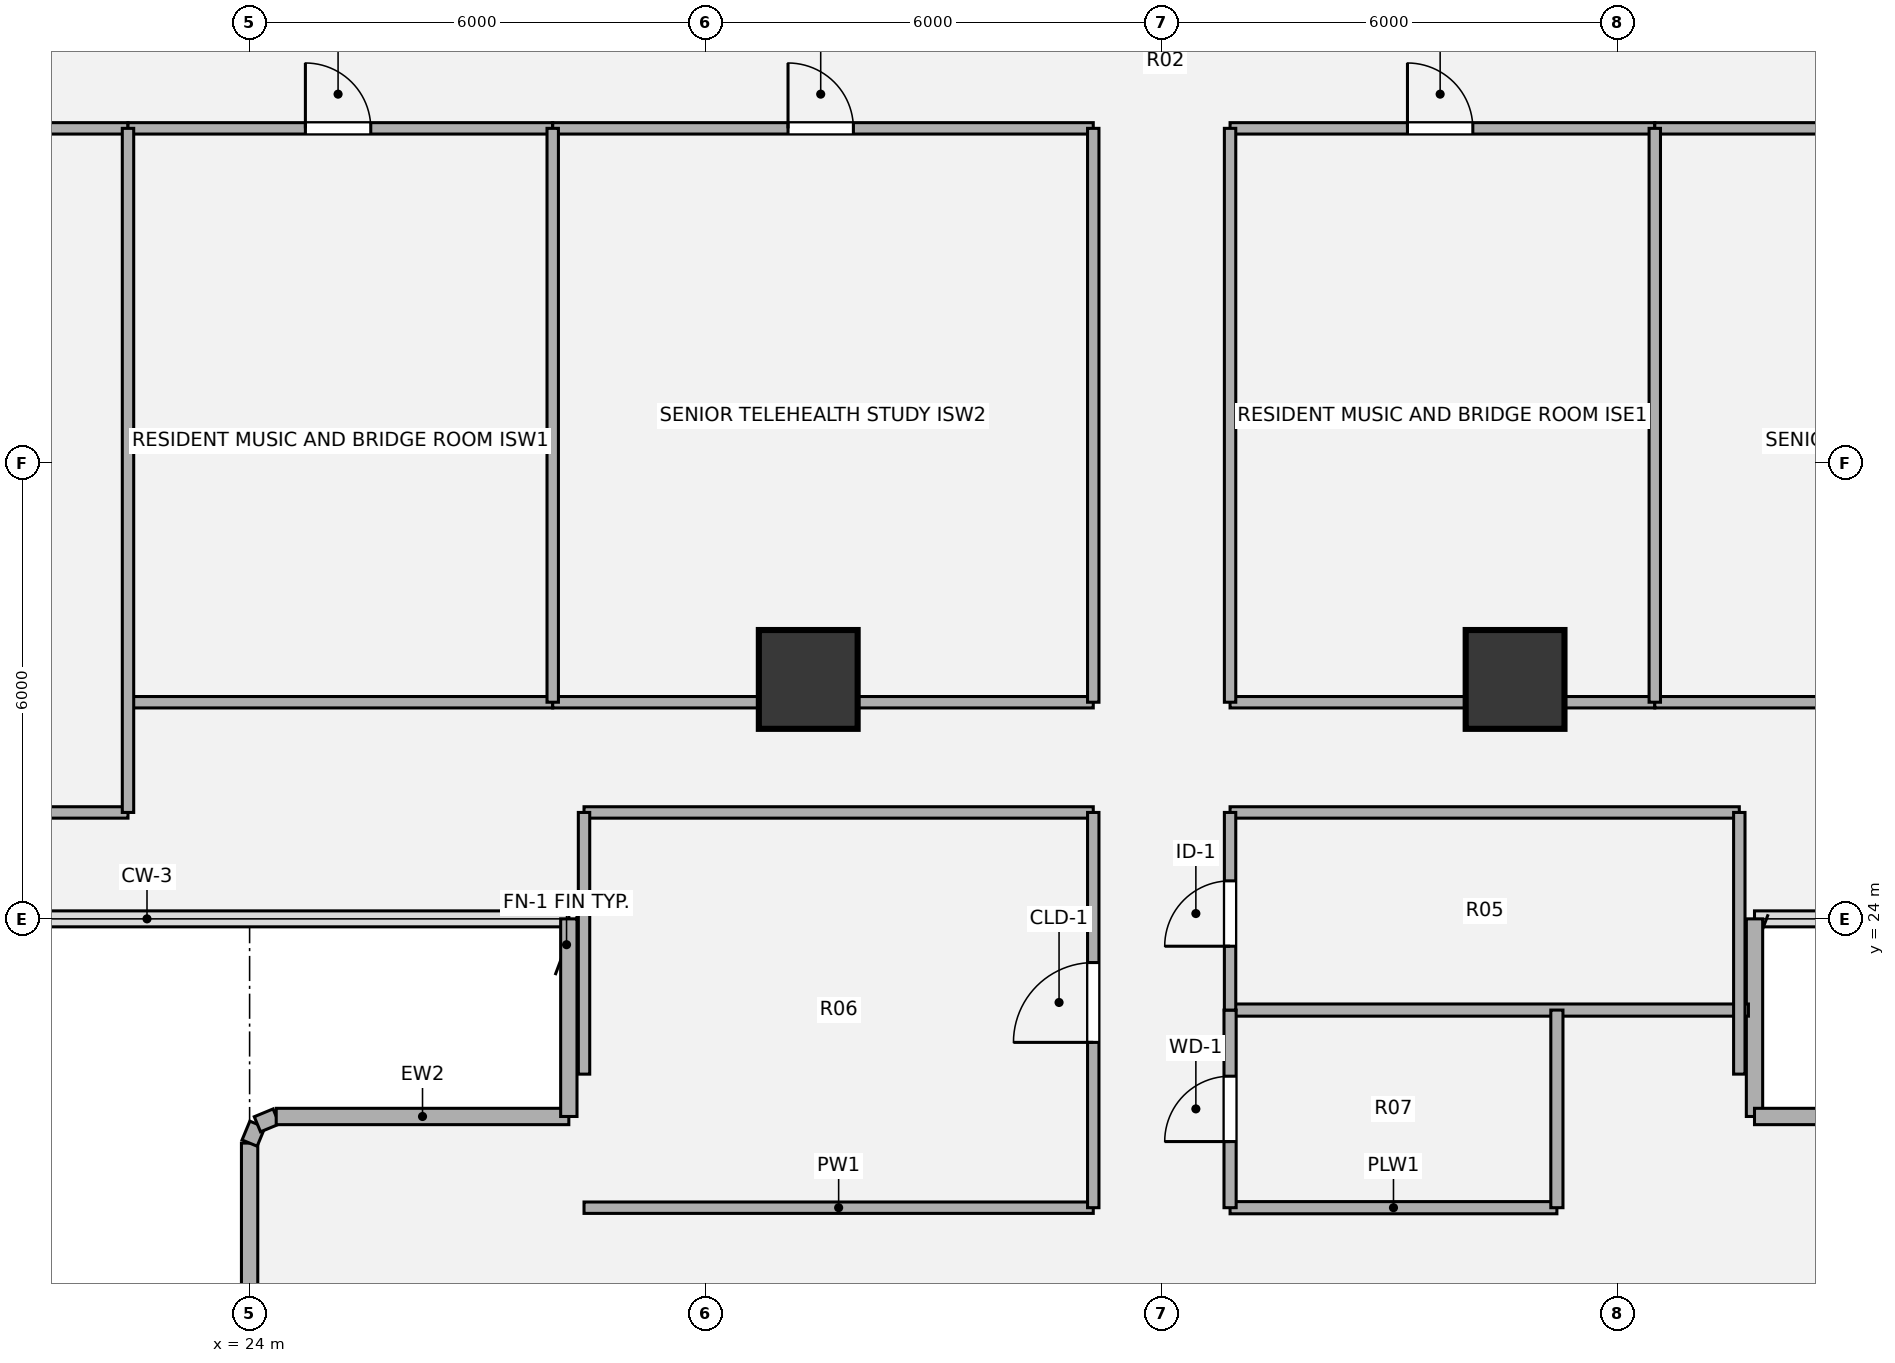
"""IFC4 building model, lengths in metres.
Left out: names, types, materials, properties, quantities, classifications, styles, units other than length and angle.
Written with IfcOpenShell. Run it as: python <this file> out.ifc"""

import sys

from ifc_helpers import new_model, si_unit, direction, frame, frame_2d, origin, origin_2d, place, context, subcontext, project, spatial, rectangle, hollow_circle, extrude, source, transform, mapped, element, fill, save


model = new_model("IFC4")
c1 = context("Model", 3, precision=1e-05, world=origin(), true_north=direction((0.0, 1.0)))
c2 = subcontext(c1, "Body", "Model", "MODEL_VIEW")
j1 = project(units=[si_unit("LENGTHUNIT", "METRE"), si_unit("PLANEANGLEUNIT", "RADIAN")], contexts=[c1])
p1 = place(None, origin())
s1 = spatial("IfcSite", under=j1, at=p1, CompositionType="ELEMENT")
p2 = place(p1, origin())
s2 = spatial("IfcBuilding", under=s1, at=p2, CompositionType="ELEMENT")
p3 = place(p2, frame((0.0, 0.0, 120.06)))
s3 = spatial("IfcBuildingStorey", under=s2, at=p3, CompositionType="ELEMENT", Elevation=120.06)
m1 = source(origin(), c2, "Body", "SweptSolid", [
    extrude(hollow_circle(Radius=0.65, WallThickness=0.045, at=origin_2d()), origin(), (0.0, 0.0, 1.0), 3.78),
])
for number, where, z_axis, x_axis in (
    (1, (31.35, 27.15, 0.0), (0.0, 0.0, 1.0), (1.0, 0.0, 0.0)),
    (2, (40.65, 27.15, 0.0), (0.0, 0.0, 1.0), (1.0, 0.0, 0.0)),
):
    element("IfcColumn", number, at=place(p3, frame(where, z_axis=z_axis, x_axis=x_axis)), inside=s3, PredefinedType="COLUMN", context=c2, shape_type="MappedRepresentation", body=[
        mapped(m1, transform((0.0, 0.0, 0.0), x_axis=(1.0, 0.0, 0.0), y_axis=(0.0, 1.0, 0.0), z_axis=(0.0, 0.0, 1.0), scale=1.0)),
    ])
p4 = place(p3, frame((24.0, 18.43, 0.0), z_axis=(0.0, 0.0, 1.0), x_axis=(0.0, 1.0, 0.0)))
e3 = element("IfcWall", 3, at=p4, inside=s3, PredefinedType="SOLIDWALL", context=c2, shape_type="SweptSolid", body=[
    extrude(rectangle(XDim=2.62, YDim=0.215, at=frame_2d((1.31, 0.0))), origin(), (0.0, 0.0, 1.0), 3.53),
])
p5 = place(p3, frame((24.0, 21.05, 0.0), z_axis=(0.0, 0.0, 1.0), x_axis=(0.382673670509, 0.923883575944, 0.0)))
e4 = element("IfcWall", 4, at=p5, inside=s3, PredefinedType="SOLIDWALL", context=c2, shape_type="SweptSolid", body=[
    extrude(rectangle(XDim=0.268, YDim=0.215, at=frame_2d((0.134, 0.0))), origin(), (0.0, 0.0, 1.0), 3.53),
])
p6 = place(p3, frame((24.103, 21.298, 0.0), z_axis=(0.0, 0.0, 1.0), x_axis=(0.924205486139, 0.381895560841, 0.0)))
e5 = element("IfcWall", 5, at=p6, inside=s3, PredefinedType="SOLIDWALL", context=c2, shape_type="SweptSolid", body=[
    extrude(rectangle(XDim=0.268, YDim=0.215, at=frame_2d((0.134, 0.0))), origin(), (0.0, 0.0, 1.0), 3.53),
])
p7 = place(p3, frame((24.35, 21.4, 0.0), z_axis=(0.0, 0.0, 1.0), x_axis=(1.0, 0.0, 0.0)))
e6 = element("IfcWall", 6, at=p7, inside=s3, PredefinedType="SOLIDWALL", context=c2, shape_type="SweptSolid", body=[
    extrude(rectangle(XDim=3.85, YDim=0.215, at=frame_2d((1.925, 0.0))), origin(), (0.0, 0.0, 1.0), 3.53),
])
for number, where, z_axis, x_axis in (
    (7, (28.2, 21.4, 0.0), (0.0, 0.0, 1.0), (0.0, 1.0, 0.0)),
    (8, (43.8, 24.0, 0.0), (0.0, 0.0, 1.0), (0.0, -1.0, 0.0)),
):
    element("IfcWall", number, at=place(p3, frame(where, z_axis=z_axis, x_axis=x_axis)), inside=s3, PredefinedType="SOLIDWALL", context=c2, shape_type="SweptSolid", body=[
        extrude(rectangle(XDim=2.6, YDim=0.215, at=frame_2d((1.3, 0.0))), origin(), (0.0, 0.0, 1.0), 3.53),
    ])
p8 = place(p3, frame((43.8, 21.4, 0.0), z_axis=(0.0, 0.0, 1.0), x_axis=(1.0, 0.0, 0.0)))
e9 = element("IfcWall", 9, at=p8, inside=s3, PredefinedType="SOLIDWALL", context=c2, shape_type="SweptSolid", body=[
    extrude(rectangle(XDim=3.85, YDim=0.215, at=frame_2d((1.925, 0.0))), origin(), (0.0, 0.0, 1.0), 3.53),
])
p9 = place(p3, frame((28.4, 20.2, 0.0), z_axis=(0.0, 0.0, 1.0), x_axis=(1.0, 0.0, 0.0)))
e10 = element("IfcWall", 10, at=p9, inside=s3, PredefinedType="PARTITIONING", context=c2, shape_type="SweptSolid", body=[
    extrude(rectangle(XDim=6.7, YDim=0.15, at=frame_2d((3.35, 0.0))), origin(), (0.0, 0.0, 1.0), 3.5),
])
p10 = place(p3, frame((36.9, 20.2, 0.0), z_axis=(0.0, 0.0, 1.0), x_axis=(1.0, 0.0, 0.0)))
e11 = element("IfcWall", 11, at=p10, inside=s3, PredefinedType="PLUMBINGWALL", context=c2, shape_type="SweptSolid", body=[
    extrude(rectangle(XDim=4.3, YDim=0.16, at=frame_2d((2.15, 0.0))), origin(), (0.0, 0.0, 1.0), 3.5),
])
p11 = place(p3, frame((36.9, 22.8, 0.0), z_axis=(0.0, 0.0, 1.0), x_axis=(1.0, 0.0, 0.0)))
e12 = element("IfcWall", 12, at=p11, inside=s3, PredefinedType="PLUMBINGWALL", context=c2, shape_type="SweptSolid", body=[
    extrude(rectangle(XDim=6.82, YDim=0.16, at=frame_2d((3.41, 0.0))), origin(), (0.0, 0.0, 1.0), 3.5),
])
p12 = place(p3, frame((14.624, 25.4, 0.0), z_axis=(0.0, 0.0, 1.0), x_axis=(1.0, 0.0, 0.0)))
e13 = element("IfcWall", 13, at=p12, inside=s3, PredefinedType="PARTITIONING", context=c2, shape_type="SweptSolid", body=[
    extrude(rectangle(XDim=7.776, YDim=0.15, at=frame_2d((3.888, 0.0))), origin(), (0.0, 0.0, 1.0), 3.5),
])
for number, where, z_axis, x_axis in (
    (14, (28.4, 25.4, 0.0), (0.0, 0.0, 1.0), (1.0, 0.0, 0.0)),
    (15, (36.9, 25.4, 0.0), (0.0, 0.0, 1.0), (1.0, 0.0, 0.0)),
):
    element("IfcWall", number, at=place(p3, frame(where, z_axis=z_axis, x_axis=x_axis)), inside=s3, PredefinedType="PARTITIONING", context=c2, shape_type="SweptSolid", body=[
        extrude(rectangle(XDim=6.7, YDim=0.15, at=frame_2d((3.35, 0.0))), origin(), (0.0, 0.0, 1.0), 3.5),
    ])
p13 = place(p3, frame((22.4, 26.85, 0.0), z_axis=(0.0, 0.0, 1.0), x_axis=(1.0, 0.0, 0.0)))
e16 = element("IfcWall", 16, at=p13, inside=s3, PredefinedType="PARTITIONING", context=c2, shape_type="SweptSolid", body=[
    extrude(rectangle(XDim=5.588, YDim=0.15, at=frame_2d((2.794, 0.0))), origin(), (0.0, 0.0, 1.0), 3.055),
])
p14 = place(p3, frame((27.988, 26.85, 0.0), z_axis=(0.0, 0.0, 1.0), x_axis=(1.0, 0.0, 0.0)))
e17 = element("IfcWall", 17, at=p14, inside=s3, PredefinedType="PARTITIONING", context=c2, shape_type="SweptSolid", body=[
    extrude(rectangle(XDim=7.112, YDim=0.15, at=frame_2d((3.556, 0.0))), origin(), (0.0, 0.0, 1.0), 2.903),
])
p15 = place(p3, frame((36.9, 26.85, 0.0), z_axis=(0.0, 0.0, 1.0), x_axis=(1.0, 0.0, 0.0)))
e18 = element("IfcWall", 18, at=p15, inside=s3, PredefinedType="PARTITIONING", context=c2, shape_type="SweptSolid", body=[
    extrude(rectangle(XDim=5.588, YDim=0.15, at=frame_2d((2.794, 0.0))), origin(), (0.0, 0.0, 1.0), 2.903),
])
p16 = place(p3, frame((42.488, 26.85, 0.0), z_axis=(0.0, 0.0, 1.0), x_axis=(1.0, 0.0, 0.0)))
e19 = element("IfcWall", 19, at=p16, inside=s3, PredefinedType="PARTITIONING", context=c2, shape_type="SweptSolid", body=[
    extrude(rectangle(XDim=7.112, YDim=0.15, at=frame_2d((3.556, 0.0))), origin(), (0.0, 0.0, 1.0), 3.055),
])
p17 = place(p3, frame((13.98, 34.4, 0.0), z_axis=(0.0, 0.0, 1.0), x_axis=(1.0, 0.0, 0.0)))
e20 = element("IfcWall", 20, at=p17, inside=s3, PredefinedType="PARTITIONING", context=c2, shape_type="SweptSolid", body=[
    extrude(rectangle(XDim=8.42, YDim=0.15, at=frame_2d((4.21, 0.0))), origin(), (0.0, 0.0, 1.0), 2.982),
])
p18 = place(p17, frame((5.995, 0.0, 0.0)))
e21 = element("IfcOpeningElement", 21, at=p18, cuts=e20, PredefinedType="OPENING", context=c2, shape_type="SweptSolid", body=[
    extrude(rectangle(XDim=1.05, YDim=2.1, at=origin_2d()), frame((0.525, 0.085, 1.05), z_axis=(0.0, -1.0, 0.0), x_axis=(1.0, 0.0, 0.0)), (0.0, 0.0, 1.0), 0.17),
])
p19 = place(p3, frame((22.4, 34.4, 0.0), z_axis=(0.0, 0.0, 1.0), x_axis=(1.0, 0.0, 0.0)))
e22 = element("IfcWall", 22, at=p19, inside=s3, PredefinedType="PARTITIONING", context=c2, shape_type="SweptSolid", body=[
    extrude(rectangle(XDim=5.588, YDim=0.15, at=frame_2d((2.794, 0.0))), origin(), (0.0, 0.0, 1.0), 2.982),
])
p20 = place(p19, frame((2.334, 0.0, 0.0)))
e23 = element("IfcOpeningElement", 23, at=p20, cuts=e22, PredefinedType="OPENING", context=c2, shape_type="SweptSolid", body=[
    extrude(rectangle(XDim=0.86, YDim=2.1, at=origin_2d()), frame((0.43, 0.085, 1.05), z_axis=(0.0, -1.0, 0.0), x_axis=(1.0, 0.0, 0.0)), (0.0, 0.0, 1.0), 0.17),
])
p21 = place(p3, frame((27.988, 34.4, 0.0), z_axis=(0.0, 0.0, 1.0), x_axis=(1.0, 0.0, 0.0)))
e24 = element("IfcWall", 24, at=p21, inside=s3, PredefinedType="PARTITIONING", context=c2, shape_type="SweptSolid", body=[
    extrude(rectangle(XDim=7.112, YDim=0.15, at=frame_2d((3.556, 0.0))), origin(), (0.0, 0.0, 1.0), 2.982),
])
p22 = place(p21, frame((3.096, 0.0, 0.0)))
e25 = element("IfcOpeningElement", 25, at=p22, cuts=e24, PredefinedType="OPENING", context=c2, shape_type="SweptSolid", body=[
    extrude(rectangle(XDim=0.86, YDim=2.1, at=origin_2d()), frame((0.43, 0.085, 1.05), z_axis=(0.0, -1.0, 0.0), x_axis=(1.0, 0.0, 0.0)), (0.0, 0.0, 1.0), 0.17),
])
p23 = place(p3, frame((36.9, 34.4, 0.0), z_axis=(0.0, 0.0, 1.0), x_axis=(1.0, 0.0, 0.0)))
e26 = element("IfcWall", 26, at=p23, inside=s3, PredefinedType="PARTITIONING", context=c2, shape_type="SweptSolid", body=[
    extrude(rectangle(XDim=5.588, YDim=0.15, at=frame_2d((2.794, 0.0))), origin(), (0.0, 0.0, 1.0), 2.982),
])
p24 = place(p23, frame((2.334, 0.0, 0.0)))
e27 = element("IfcOpeningElement", 27, at=p24, cuts=e26, PredefinedType="OPENING", context=c2, shape_type="SweptSolid", body=[
    extrude(rectangle(XDim=0.86, YDim=2.1, at=origin_2d()), frame((0.43, 0.085, 1.05), z_axis=(0.0, -1.0, 0.0), x_axis=(1.0, 0.0, 0.0)), (0.0, 0.0, 1.0), 0.17),
])
p25 = place(p3, frame((42.488, 34.4, 0.0), z_axis=(0.0, 0.0, 1.0), x_axis=(1.0, 0.0, 0.0)))
e28 = element("IfcWall", 28, at=p25, inside=s3, PredefinedType="PARTITIONING", context=c2, shape_type="SweptSolid", body=[
    extrude(rectangle(XDim=7.112, YDim=0.15, at=frame_2d((3.556, 0.0))), origin(), (0.0, 0.0, 1.0), 2.982),
])
p26 = place(p25, frame((3.096, 0.0, 0.0)))
e29 = element("IfcOpeningElement", 29, at=p26, cuts=e28, PredefinedType="OPENING", context=c2, shape_type="SweptSolid", body=[
    extrude(rectangle(XDim=0.86, YDim=2.1, at=origin_2d()), frame((0.43, 0.085, 1.05), z_axis=(0.0, -1.0, 0.0), x_axis=(1.0, 0.0, 0.0)), (0.0, 0.0, 1.0), 0.17),
])
p27 = place(p3, frame((22.4, 25.4, 0.0), z_axis=(0.0, 0.0, 1.0), x_axis=(0.0, 1.0, 0.0)))
e30 = element("IfcWall", 30, at=p27, inside=s3, PredefinedType="PARTITIONING", context=c2, shape_type="SweptSolid", body=[
    extrude(rectangle(XDim=9.0, YDim=0.15, at=frame_2d((4.5, 0.0))), origin(), (0.0, 0.0, 1.0), 3.5),
])
p28 = place(p3, frame((27.988, 26.85, 0.0), z_axis=(0.0, 0.0, 1.0), x_axis=(0.0, 1.0, 0.0)))
e31 = element("IfcWall", 31, at=p28, inside=s3, PredefinedType="PARTITIONING", context=c2, shape_type="SweptSolid", body=[
    extrude(rectangle(XDim=7.55, YDim=0.15, at=frame_2d((3.775, 0.0))), origin(), (0.0, 0.0, 1.0), 3.5),
])
p29 = place(p3, frame((28.4, 21.957, 0.0), z_axis=(0.0, 0.0, 1.0), x_axis=(0.0, 1.0, 0.0)))
e32 = element("IfcWall", 32, at=p29, inside=s3, PredefinedType="PARTITIONING", context=c2, shape_type="SweptSolid", body=[
    extrude(rectangle(XDim=3.443, YDim=0.15, at=frame_2d((1.721, 0.0))), origin(), (0.0, 0.0, 1.0), 3.5),
])
p30 = place(p3, frame((35.1, 20.2, 0.0), z_axis=(0.0, 0.0, 1.0), x_axis=(0.0, 1.0, 0.0)))
e33 = element("IfcWall", 33, at=p30, inside=s3, PredefinedType="PARTITIONING", context=c2, shape_type="SweptSolid", body=[
    extrude(rectangle(XDim=5.2, YDim=0.15, at=frame_2d((2.6, 0.0))), origin(), (0.0, 0.0, 1.0), 3.5),
])
p31 = place(p30, frame((2.175, 0.0, 0.0)))
e34 = element("IfcOpeningElement", 34, at=p31, cuts=e33, PredefinedType="OPENING", context=c2, shape_type="SweptSolid", body=[
    extrude(rectangle(XDim=1.05, YDim=2.1, at=origin_2d()), frame((0.525, 0.085, 1.05), z_axis=(0.0, -1.0, 0.0), x_axis=(1.0, 0.0, 0.0)), (0.0, 0.0, 1.0), 0.17),
])
p32 = place(p3, frame((35.1, 26.85, 0.0), z_axis=(0.0, 0.0, 1.0), x_axis=(0.0, 1.0, 0.0)))
e35 = element("IfcWall", 35, at=p32, inside=s3, PredefinedType="PARTITIONING", context=c2, shape_type="SweptSolid", body=[
    extrude(rectangle(XDim=7.55, YDim=0.15, at=frame_2d((3.775, 0.0))), origin(), (0.0, 0.0, 1.0), 3.5),
])
p33 = place(p3, frame((36.9, 20.2, 0.0), z_axis=(0.0, 0.0, 1.0), x_axis=(0.0, 1.0, 0.0)))
e36 = element("IfcWall", 36, at=p33, inside=s3, PredefinedType="PLUMBINGWALL", context=c2, shape_type="SweptSolid", body=[
    extrude(rectangle(XDim=2.6, YDim=0.16, at=frame_2d((1.3, 0.0))), origin(), (0.0, 0.0, 1.0), 3.5),
])
p34 = place(p33, frame((0.87, 0.0, 0.0)))
e37 = element("IfcOpeningElement", 37, at=p34, cuts=e36, PredefinedType="OPENING", context=c2, shape_type="SweptSolid", body=[
    extrude(rectangle(XDim=0.86, YDim=2.1, at=origin_2d()), frame((0.43, 0.09, 1.05), z_axis=(0.0, -1.0, 0.0), x_axis=(1.0, 0.0, 0.0)), (0.0, 0.0, 1.0), 0.18),
])
p35 = place(p3, frame((36.9, 22.8, 0.0), z_axis=(0.0, 0.0, 1.0), x_axis=(0.0, 1.0, 0.0)))
e38 = element("IfcWall", 38, at=p35, inside=s3, PredefinedType="PARTITIONING", context=c2, shape_type="SweptSolid", body=[
    extrude(rectangle(XDim=2.6, YDim=0.15, at=frame_2d((1.3, 0.0))), origin(), (0.0, 0.0, 1.0), 3.5),
])
p36 = place(p35, frame((0.84, 0.0, 0.0)))
e39 = element("IfcOpeningElement", 39, at=p36, cuts=e38, PredefinedType="OPENING", context=c2, shape_type="SweptSolid", body=[
    extrude(rectangle(XDim=0.86, YDim=2.1, at=origin_2d()), frame((0.43, 0.085, 1.05), z_axis=(0.0, -1.0, 0.0), x_axis=(1.0, 0.0, 0.0)), (0.0, 0.0, 1.0), 0.17),
])
p37 = place(p3, frame((36.9, 26.85, 0.0), z_axis=(0.0, 0.0, 1.0), x_axis=(0.0, 1.0, 0.0)))
e40 = element("IfcWall", 40, at=p37, inside=s3, PredefinedType="PARTITIONING", context=c2, shape_type="SweptSolid", body=[
    extrude(rectangle(XDim=7.55, YDim=0.15, at=frame_2d((3.775, 0.0))), origin(), (0.0, 0.0, 1.0), 3.5),
])
p38 = place(p3, frame((41.2, 20.2, 0.0), z_axis=(0.0, 0.0, 1.0), x_axis=(0.0, 1.0, 0.0)))
e41 = element("IfcWall", 41, at=p38, inside=s3, PredefinedType="PLUMBINGWALL", context=c2, shape_type="SweptSolid", body=[
    extrude(rectangle(XDim=2.6, YDim=0.16, at=frame_2d((1.3, 0.0))), origin(), (0.0, 0.0, 1.0), 2.815),
])
p39 = place(p3, frame((42.488, 26.85, 0.0), z_axis=(0.0, 0.0, 1.0), x_axis=(0.0, 1.0, 0.0)))
e42 = element("IfcWall", 42, at=p39, inside=s3, PredefinedType="PARTITIONING", context=c2, shape_type="SweptSolid", body=[
    extrude(rectangle(XDim=7.55, YDim=0.15, at=frame_2d((3.775, 0.0))), origin(), (0.0, 0.0, 1.0), 3.5),
])
p40 = place(p3, frame((43.6, 21.958, 0.0), z_axis=(0.0, 0.0, 1.0), x_axis=(0.0, 1.0, 0.0)))
e43 = element("IfcWall", 43, at=p40, inside=s3, PredefinedType="PARTITIONING", context=c2, shape_type="SweptSolid", body=[
    extrude(rectangle(XDim=3.442, YDim=0.15, at=frame_2d((1.721, 0.0))), origin(), (0.0, 0.0, 1.0), 3.5),
])
m2 = source(origin(), c2, "Body", "SweptSolid", [
    extrude(rectangle(XDim=0.86, YDim=2.1, at=origin_2d()), frame((0.43, 0.025, 1.05), z_axis=(0.0, -1.0, 0.0), x_axis=(1.0, 0.0, 0.0)), (0.0, 0.0, 1.0), 0.05),
])
p41 = place(p20, origin())
e44 = element("IfcDoor", 44, at=p41, inside=s3, OperationType="SINGLE_SWING_LEFT", PredefinedType="DOOR", context=c2, shape_type="MappedRepresentation", body=[
    mapped(m2, transform((0.0, 0.0, 0.0), x_axis=(1.0, 0.0, 0.0), y_axis=(0.0, 1.0, 0.0), z_axis=(0.0, 0.0, 1.0), scale=1.0)),
])
fill(e23, e44)
p42 = place(p22, origin())
e45 = element("IfcDoor", 45, at=p42, inside=s3, OperationType="SINGLE_SWING_LEFT", PredefinedType="DOOR", context=c2, shape_type="MappedRepresentation", body=[
    mapped(m2, transform((0.0, 0.0, 0.0), x_axis=(1.0, 0.0, 0.0), y_axis=(0.0, 1.0, 0.0), z_axis=(0.0, 0.0, 1.0), scale=1.0)),
])
fill(e25, e45)
p43 = place(p24, origin())
e46 = element("IfcDoor", 46, at=p43, inside=s3, OperationType="SINGLE_SWING_LEFT", PredefinedType="DOOR", context=c2, shape_type="MappedRepresentation", body=[
    mapped(m2, transform((0.0, 0.0, 0.0), x_axis=(1.0, 0.0, 0.0), y_axis=(0.0, 1.0, 0.0), z_axis=(0.0, 0.0, 1.0), scale=1.0)),
])
fill(e27, e46)
m3 = source(origin(), c2, "Body", "SweptSolid", [
    extrude(rectangle(XDim=1.05, YDim=2.1, at=origin_2d()), frame((0.525, 0.025, 1.05), z_axis=(0.0, -1.0, 0.0), x_axis=(1.0, 0.0, 0.0)), (0.0, 0.0, 1.0), 0.05),
])
p44 = place(p31, origin())
e47 = element("IfcDoor", 47, at=p44, inside=s3, OperationType="SINGLE_SWING_LEFT", PredefinedType="DOOR", context=c2, shape_type="MappedRepresentation", body=[
    mapped(m3, transform((0.0, 0.0, 0.0), x_axis=(1.0, 0.0, 0.0), y_axis=(0.0, 1.0, 0.0), z_axis=(0.0, 0.0, 1.0), scale=1.0)),
])
fill(e34, e47)
m4 = source(origin(), c2, "Body", "SweptSolid", [
    extrude(rectangle(XDim=0.86, YDim=2.1, at=origin_2d()), frame((0.43, 0.025, 1.05), z_axis=(0.0, -1.0, 0.0), x_axis=(1.0, 0.0, 0.0)), (0.0, 0.0, 1.0), 0.05),
])
p45 = place(p34, origin())
e48 = element("IfcDoor", 48, at=p45, inside=s3, OperationType="SINGLE_SWING_LEFT", PredefinedType="DOOR", context=c2, shape_type="MappedRepresentation", body=[
    mapped(m4, transform((0.0, 0.0, 0.0), x_axis=(1.0, 0.0, 0.0), y_axis=(0.0, 1.0, 0.0), z_axis=(0.0, 0.0, 1.0), scale=1.0)),
])
fill(e37, e48)
p46 = place(p36, origin())
e49 = element("IfcDoor", 49, at=p46, inside=s3, OperationType="SINGLE_SWING_LEFT", PredefinedType="DOOR", context=c2, shape_type="MappedRepresentation", body=[
    mapped(m2, transform((0.0, 0.0, 0.0), x_axis=(1.0, 0.0, 0.0), y_axis=(0.0, 1.0, 0.0), z_axis=(0.0, 0.0, 1.0), scale=1.0)),
])
fill(e39, e49)
save(model, sys.argv[1])
